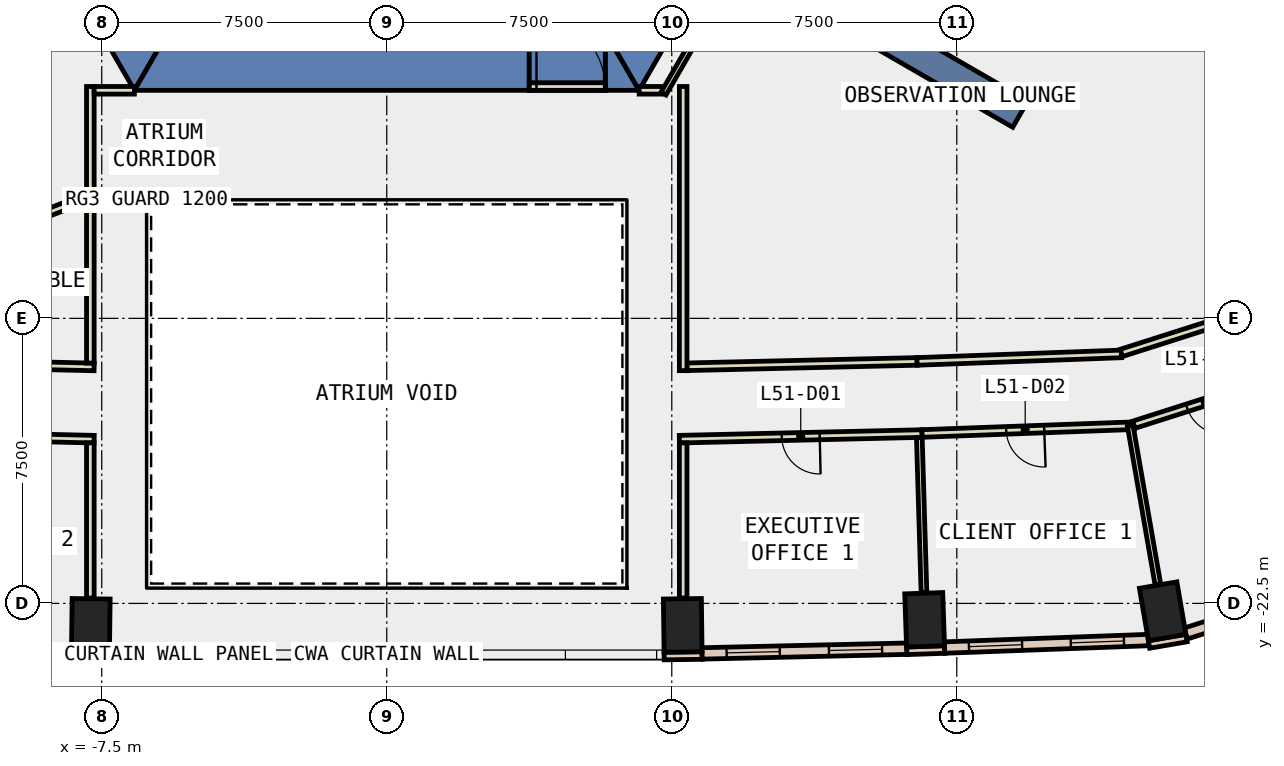
"""IFC4 building model, lengths in metres.
Left out: names, types, materials, properties, quantities, classifications, styles, units other than length and angle.
Written with IfcOpenShell. Run it as: python <this file> out.ifc"""

import sys

from ifc_helpers import new_model, si_unit, direction, frame, frame_2d, origin, origin_2d, place, context, subcontext, project, spatial, polyline, rectangle, outline, extrude, element, fill, save


model = new_model("IFC4")
c1 = context("Model", 3, precision=1e-05, world=origin(), true_north=direction((0.0, 1.0)))
c2 = subcontext(c1, "Body", "Model", "MODEL_VIEW")
j1 = project(units=[si_unit("LENGTHUNIT", "METRE"), si_unit("PLANEANGLEUNIT", "RADIAN")], contexts=[c1])
p1 = place(None, origin())
s1 = spatial("IfcSite", under=j1, at=p1, CompositionType="ELEMENT")
p2 = place(p1, origin())
s2 = spatial("IfcBuilding", under=s1, at=p2, CompositionType="ELEMENT")
p3 = place(p2, frame((0.0, 0.0, 227.6)))
s3 = spatial("IfcBuildingStorey", under=s2, at=p3, CompositionType="ELEMENT", Elevation=227.6)
for number, where, z_axis, x_axis in (
    (1, (-7.788, -23.078, -0.4), (0.0, 0.0, 1.0), (-1.0, 0.013, 0.0)),
    (2, (7.788, -23.078, -0.4), (0.0, 0.0, 1.0), (1.0, 0.013, 0.0)),
    (3, (14.154, -22.931, -0.4), (0.0, 0.0, 1.0), (0.999, 0.034, 0.0)),
    (4, (20.417, -22.708, -0.4), (0.0, 0.0, 1.0), (0.986, 0.169, 0.0)),
):
    element("IfcColumn", number, at=place(p3, frame(where, z_axis=z_axis, x_axis=x_axis)), inside=s3, PredefinedType="COLUMN", context=c2, shape_type="SweptSolid", body=[
        extrude(rectangle(XDim=1.0, YDim=1.4, at=origin_2d()), origin(), (0.0, 0.0, 1.0), 4.2),
    ])
p4 = place(p3, frame((0.0, 0.0, -0.4)))
e5 = element("IfcWall", 5, at=p4, inside=s3, PredefinedType="SHEAR", context=c2, shape_type="SweptSolid", body=[
    extrude(outline(polyline([(-13.279, 2.5), (-6.64, -9.0), (-5.831, -7.6), (-11.662, 2.5), (-13.279, 2.5)])), origin(), (0.0, 0.0, 1.0), 4.2),
])
p5 = place(p3, frame((0.0, 0.0, -0.4)))
e6 = element("IfcWall", 6, at=p5, inside=s3, PredefinedType="SHEAR", context=c2, shape_type="SweptSolid", body=[
    extrude(outline(polyline([(3.75, -9.0), (3.75, -7.6), (-5.831, -7.6), (-6.64, -9.0), (3.75, -9.0)])), origin(), (0.0, 0.0, 1.0), 4.2),
])
p6 = place(p3, frame((0.0, 0.0, -0.4)))
e7 = element("IfcWall", 7, at=p6, inside=s3, PredefinedType="SHEAR", context=c2, shape_type="SweptSolid", body=[
    extrude(outline(polyline([(5.75, -7.6), (5.75, -9.0), (6.64, -9.0), (5.831, -7.6), (5.75, -7.6)])), origin(), (0.0, 0.0, 1.0), 4.2),
])
p7 = place(p3, frame((0.0, 0.0, 3.6)))
e8 = element("IfcWall", 8, at=p7, inside=s3, PredefinedType="SHEAR", context=c2, shape_type="SweptSolid", body=[
    extrude(outline(polyline([(5.75, -9.0), (5.75, -7.6), (3.75, -7.6), (3.75, -9.0), (5.75, -9.0)])), origin(), (0.0, 0.0, 1.0), 0.2),
])
p8 = place(p3, frame((0.0, 0.0, -0.4)))
e9 = element("IfcWall", 9, at=p8, inside=s3, PredefinedType="SHEAR", context=c2, shape_type="SweptSolid", body=[
    extrude(outline(polyline([(6.64, -9.0), (13.279, 2.5), (11.662, 2.5), (5.831, -7.6), (6.64, -9.0)])), origin(), (0.0, 0.0, 1.0), 4.2),
])
for number, where, z_axis, x_axis in (
    (10, (8.877, -5.125, -0.4), (0.0, 0.0, 1.0), (0.866, -0.5, 0.0)),
    (11, (-8.877, -5.125, -0.4), (0.0, 0.0, 1.0), (-0.866, -0.5, 0.0)),
):
    element("IfcWall", number, at=place(p3, frame(where, z_axis=z_axis, x_axis=x_axis)), inside=s3, PredefinedType="SHEAR", context=c2, shape_type="SweptSolid", body=[
        extrude(rectangle(XDim=9.0, YDim=0.8, at=frame_2d((4.5, 0.0))), origin(), (0.0, 0.0, 1.0), 4.2),
    ])
for number, where, z_axis, x_axis in (
    (12, (-8.299, -23.871, 0.0), (0.0, 0.0, 1.0), (1.0, -0.014, 0.0)),
    (13, (7.299, -23.885, 0.0), (0.0, 0.0, 1.0), (1.0, 0.014, 0.0)),
):
    element("IfcWall", number, at=place(p3, frame(where, z_axis=z_axis, x_axis=x_axis)), inside=s3, PredefinedType="STANDARD", context=c2, shape_type="SweptSolid", body=[
        extrude(rectangle(XDim=1.0, YDim=0.2, at=frame_2d((0.5, 0.0))), origin(), (0.0, 0.0, 1.0), 3.8),
    ])
p9 = place(p3, frame((13.682, -23.747, 0.0), z_axis=(0.0, 0.0, 1.0), x_axis=(0.999415245245, 0.034193092457, 0.0)))
e14 = element("IfcWall", 14, at=p9, inside=s3, PredefinedType="STANDARD", context=c2, shape_type="SweptSolid", body=[
    extrude(rectangle(XDim=1.0, YDim=0.2, at=frame_2d((0.5, 0.0))), origin(), (0.0, 0.0, 1.0), 3.8),
])
p10 = place(p3, frame((20.059, -23.581, 0.0), z_axis=(0.0, 0.0, 1.0), x_axis=(0.985631544579, 0.168909615862, 0.0)))
e15 = element("IfcWall", 15, at=p10, inside=s3, PredefinedType="STANDARD", context=c2, shape_type="SweptSolid", body=[
    extrude(rectangle(XDim=1.0, YDim=0.2, at=frame_2d((0.5, 0.0))), origin(), (0.0, 0.0, 1.0), 3.8),
])
p11 = place(p3, frame((-13.681, -23.692, 0.0), z_axis=(0.0, 0.0, 1.0), x_axis=(0.999734766333, -0.023030349233, 0.0)))
e16 = element("IfcWall", 16, at=p11, inside=s3, PredefinedType="STANDARD", context=c2, shape_type="SweptSolid", body=[
    extrude(rectangle(XDim=5.385, YDim=0.3, at=frame_2d((2.693, 0.0))), origin(), (0.0, 0.0, 1.0), 3.8),
])
p12 = place(p11, frame((0.646, 0.0, 0.9)))
e17 = element("IfcOpeningElement", 17, at=p12, cuts=e16, PredefinedType="OPENING", context=c2, shape_type="SweptSolid", body=[
    extrude(rectangle(XDim=1.4, YDim=2.6, at=frame_2d((0.7, 1.3))), frame((0.0, 0.16, 0.0), z_axis=(0.0, -1.0, 0.0), x_axis=(1.0, 0.0, 0.0)), (0.0, 0.0, 1.0), 0.32),
])
p13 = place(p11, frame((3.339, 0.0, 0.9)))
e18 = element("IfcOpeningElement", 18, at=p13, cuts=e16, PredefinedType="OPENING", context=c2, shape_type="SweptSolid", body=[
    extrude(rectangle(XDim=1.4, YDim=2.6, at=frame_2d((0.7, 1.3))), frame((0.0, 0.16, 0.0), z_axis=(0.0, -1.0, 0.0), x_axis=(1.0, 0.0, 0.0)), (0.0, 0.0, 1.0), 0.32),
])
p14 = place(p3, frame((8.297, -23.816, 0.0), z_axis=(0.0, 0.0, 1.0), x_axis=(0.999734766333, 0.023030349233, 0.0)))
e19 = element("IfcWall", 19, at=p14, inside=s3, PredefinedType="STANDARD", context=c2, shape_type="SweptSolid", body=[
    extrude(rectangle(XDim=5.385, YDim=0.3, at=frame_2d((2.693, 0.0))), origin(), (0.0, 0.0, 1.0), 3.8),
])
p15 = place(p14, frame((0.646, 0.0, 0.9)))
e20 = element("IfcOpeningElement", 20, at=p15, cuts=e19, PredefinedType="OPENING", context=c2, shape_type="SweptSolid", body=[
    extrude(rectangle(XDim=1.4, YDim=2.6, at=frame_2d((0.7, 1.3))), frame((0.0, 0.16, 0.0), z_axis=(0.0, -1.0, 0.0), x_axis=(1.0, 0.0, 0.0)), (0.0, 0.0, 1.0), 0.32),
])
p16 = place(p14, frame((3.339, 0.0, 0.9)))
e21 = element("IfcOpeningElement", 21, at=p16, cuts=e19, PredefinedType="OPENING", context=c2, shape_type="SweptSolid", body=[
    extrude(rectangle(XDim=1.4, YDim=2.6, at=frame_2d((0.7, 1.3))), frame((0.0, 0.16, 0.0), z_axis=(0.0, -1.0, 0.0), x_axis=(1.0, 0.0, 0.0)), (0.0, 0.0, 1.0), 0.32),
])
p17 = place(p3, frame((14.679, -23.662, 0.0), z_axis=(0.0, 0.0, 1.0), x_axis=(0.999318693414, 0.036907302717, 0.0)))
e22 = element("IfcWall", 22, at=p17, inside=s3, PredefinedType="STANDARD", context=c2, shape_type="SweptSolid", body=[
    extrude(rectangle(XDim=5.365, YDim=0.3, at=frame_2d((2.682, 0.0))), origin(), (0.0, 0.0, 1.0), 3.8),
])
p18 = place(p17, frame((0.641, 0.0, 0.9)))
e23 = element("IfcOpeningElement", 23, at=p18, cuts=e22, PredefinedType="OPENING", context=c2, shape_type="SweptSolid", body=[
    extrude(rectangle(XDim=1.4, YDim=2.6, at=frame_2d((0.7, 1.3))), frame((0.0, 0.16, 0.0), z_axis=(0.0, -1.0, 0.0), x_axis=(1.0, 0.0, 0.0)), (0.0, 0.0, 1.0), 0.32),
])
p19 = place(p17, frame((3.323, 0.0, 0.9)))
e24 = element("IfcOpeningElement", 24, at=p19, cuts=e22, PredefinedType="OPENING", context=c2, shape_type="SweptSolid", body=[
    extrude(rectangle(XDim=1.4, YDim=2.6, at=frame_2d((0.7, 1.3))), frame((0.0, 0.16, 0.0), z_axis=(0.0, -1.0, 0.0), x_axis=(1.0, 0.0, 0.0)), (0.0, 0.0, 1.0), 0.32),
])
p20 = place(p3, frame((21.023, -23.293, 0.0), z_axis=(0.0, 0.0, 1.0), x_axis=(0.952886818649, 0.30332608006, 0.0)))
e25 = element("IfcWall", 25, at=p20, inside=s3, PredefinedType="STANDARD", context=c2, shape_type="SweptSolid", body=[
    extrude(rectangle(XDim=4.939, YDim=0.3, at=frame_2d((2.469, 0.0))), origin(), (0.0, 0.0, 1.0), 3.8),
])
p21 = place(p20, frame((1.769, 0.0, 0.9)))
e26 = element("IfcOpeningElement", 26, at=p21, cuts=e25, PredefinedType="OPENING", context=c2, shape_type="SweptSolid", body=[
    extrude(rectangle(XDim=1.4, YDim=2.6, at=frame_2d((0.7, 1.3))), frame((0.0, 0.16, 0.0), z_axis=(0.0, -1.0, 0.0), x_axis=(1.0, 0.0, 0.0)), (0.0, 0.0, 1.0), 0.32),
])
p22 = place(p3, frame((7.9, -16.274, 0.0), z_axis=(0.0, 0.0, 1.0), x_axis=(0.999729409829, 0.023261709391, 0.0)))
e27 = element("IfcWall", 27, at=p22, inside=s3, PredefinedType="PARTITIONING", context=c2, shape_type="SweptSolid", body=[
    extrude(rectangle(XDim=6.056, YDim=0.2, at=frame_2d((3.028, 0.0))), origin(), (0.0, 0.0, 1.0), 3.8),
])
p23 = place(p3, frame((13.954, -16.133, 0.0), z_axis=(0.0, 0.0, 1.0), x_axis=(0.999323686931, 0.036771847101, 0.0)))
e28 = element("IfcWall", 28, at=p23, inside=s3, PredefinedType="PARTITIONING", context=c2, shape_type="SweptSolid", body=[
    extrude(rectangle(XDim=5.385, YDim=0.2, at=frame_2d((2.692, 0.0))), origin(), (0.0, 0.0, 1.0), 3.8),
])
p24 = place(p3, frame((19.33, -15.909, 0.0), z_axis=(0.0, 0.0, 1.0), x_axis=(0.952831275662, 0.303500510906, 0.0)))
e29 = element("IfcWall", 29, at=p24, inside=s3, PredefinedType="PARTITIONING", context=c2, shape_type="SweptSolid", body=[
    extrude(rectangle(XDim=3.259, YDim=0.2, at=frame_2d((1.629, 0.0))), origin(), (0.0, 0.0, 1.0), 3.8),
])
p25 = place(p3, frame((23.121, -9.819, 0.0), z_axis=(0.0, 0.0, 1.0), x_axis=(-0.469450210487, 0.882958945746, 0.0)))
e30 = element("IfcWall", 30, at=p25, inside=s3, PredefinedType="PARTITIONING", context=c2, shape_type="SweptSolid", body=[
    extrude(rectangle(XDim=7.886, YDim=0.2, at=frame_2d((3.943, 0.0))), origin(), (0.0, 0.0, 1.0), 3.8),
])
p26 = place(p3, frame((-13.954, -16.133, 0.0), z_axis=(0.0, 0.0, 1.0), x_axis=(0.999731273021, -0.023181495732, 0.0)))
e31 = element("IfcWall", 31, at=p26, inside=s3, PredefinedType="PARTITIONING", context=c2, shape_type="SweptSolid", body=[
    extrude(rectangle(XDim=6.256, YDim=0.2, at=frame_2d((3.128, 0.0))), origin(), (0.0, 0.0, 1.0), 3.8),
])
p27 = place(p26, frame((2.628, 0.0, 0.0)))
e32 = element("IfcOpeningElement", 32, at=p27, cuts=e31, PredefinedType="OPENING", context=c2, shape_type="SweptSolid", body=[
    extrude(rectangle(XDim=1.0, YDim=2.1, at=frame_2d((0.5, 1.05))), frame((0.0, 0.11, 0.0), z_axis=(0.0, -1.0, 0.0), x_axis=(1.0, 0.0, 0.0)), (0.0, 0.0, 1.0), 0.22),
])
p28 = place(p3, frame((14.086, -18.031, 0.0), z_axis=(0.0, 0.0, 1.0), x_axis=(-0.999731734638, -0.023161579355, 0.0)))
e33 = element("IfcWall", 33, at=p28, inside=s3, PredefinedType="PARTITIONING", context=c2, shape_type="SweptSolid", body=[
    extrude(rectangle(XDim=6.388, YDim=0.2, at=frame_2d((3.194, 0.0))), origin(), (0.0, 0.0, 1.0), 3.8),
])
p29 = place(p28, frame((2.694, 0.0, 0.0)))
e34 = element("IfcOpeningElement", 34, at=p29, cuts=e33, PredefinedType="OPENING", context=c2, shape_type="SweptSolid", body=[
    extrude(rectangle(XDim=1.0, YDim=2.1, at=frame_2d((0.5, 1.05))), frame((0.0, 0.11, 0.0), z_axis=(0.0, -1.0, 0.0), x_axis=(1.0, 0.0, 0.0)), (0.0, 0.0, 1.0), 0.22),
])
p30 = place(p3, frame((19.664, -17.824, 0.0), z_axis=(0.0, 0.0, 1.0), x_axis=(-0.999324862533, -0.036739884652, 0.0)))
e35 = element("IfcWall", 35, at=p30, inside=s3, PredefinedType="PARTITIONING", context=c2, shape_type="SweptSolid", body=[
    extrude(rectangle(XDim=5.582, YDim=0.2, at=frame_2d((2.791, 0.0))), origin(), (0.0, 0.0, 1.0), 3.8),
])
p31 = place(p30, frame((2.366, 0.0, 0.0)))
e36 = element("IfcOpeningElement", 36, at=p31, cuts=e35, PredefinedType="OPENING", context=c2, shape_type="SweptSolid", body=[
    extrude(rectangle(XDim=1.0, YDim=2.1, at=frame_2d((0.5, 1.05))), frame((0.0, 0.11, 0.0), z_axis=(0.0, -1.0, 0.0), x_axis=(1.0, 0.0, 0.0)), (0.0, 0.0, 1.0), 0.22),
])
p32 = place(p3, frame((23.412, -16.603, 0.0), z_axis=(0.0, 0.0, 1.0), x_axis=(-0.952838618572, -0.303477457083, 0.0)))
e37 = element("IfcWall", 37, at=p32, inside=s3, PredefinedType="PARTITIONING", context=c2, shape_type="SweptSolid", body=[
    extrude(rectangle(XDim=3.938, YDim=0.2, at=frame_2d((1.969, 0.0))), origin(), (0.0, 0.0, 1.0), 3.8),
])
p33 = place(p32, frame((1.469, 0.0, 0.0)))
e38 = element("IfcOpeningElement", 38, at=p33, cuts=e37, PredefinedType="OPENING", context=c2, shape_type="SweptSolid", body=[
    extrude(rectangle(XDim=1.0, YDim=2.1, at=frame_2d((0.5, 1.05))), frame((0.0, 0.11, 0.0), z_axis=(0.0, -1.0, 0.0), x_axis=(1.0, 0.0, 0.0)), (0.0, 0.0, 1.0), 0.22),
])
p34 = place(p3, frame((21.089, -1.949, 0.0), z_axis=(0.0, 0.0, 1.0), x_axis=(0.469431794586, -0.882968736837, 0.0)))
e39 = element("IfcWall", 39, at=p34, inside=s3, PredefinedType="PARTITIONING", context=c2, shape_type="SweptSolid", body=[
    extrude(rectangle(XDim=8.046, YDim=0.2, at=frame_2d((4.023, 0.0))), origin(), (0.0, 0.0, 1.0), 3.8),
])
p35 = place(p34, frame((3.522, 0.0, 0.0)))
e40 = element("IfcOpeningElement", 40, at=p35, cuts=e39, PredefinedType="OPENING", context=c2, shape_type="SweptSolid", body=[
    extrude(rectangle(XDim=1.0, YDim=2.1, at=frame_2d((0.5, 1.05))), frame((0.0, 0.11, 0.0), z_axis=(0.0, -1.0, 0.0), x_axis=(1.0, 0.0, 0.0)), (0.0, 0.0, 1.0), 0.22),
])
p36 = place(p3, frame((-7.7, -18.179, 0.0), z_axis=(0.0, 0.0, 1.0), x_axis=(-0.999729714353, 0.023248618029, 0.0)))
e41 = element("IfcWall", 41, at=p36, inside=s3, PredefinedType="PARTITIONING", context=c2, shape_type="SweptSolid", body=[
    extrude(rectangle(XDim=6.238, YDim=0.2, at=frame_2d((3.119, 0.0))), origin(), (0.0, 0.0, 1.0), 3.8),
])
p37 = place(p36, frame((2.694, 0.0, 0.0)))
e42 = element("IfcOpeningElement", 42, at=p37, cuts=e41, PredefinedType="OPENING", context=c2, shape_type="SweptSolid", body=[
    extrude(rectangle(XDim=1.0, YDim=2.1, at=frame_2d((0.5, 1.05))), frame((0.0, 0.11, 0.0), z_axis=(0.0, -1.0, 0.0), x_axis=(1.0, 0.0, 0.0)), (0.0, 0.0, 1.0), 0.22),
])
p38 = place(p3, frame((6.641, -8.999, 0.0), z_axis=(0.0, 0.0, 1.0), x_axis=(1.0, 0.0, 0.0)))
e43 = element("IfcWall", 43, at=p38, inside=s3, PredefinedType="PARTITIONING", context=c2, shape_type="SweptSolid", body=[
    extrude(rectangle(XDim=0.617, YDim=0.2, at=frame_2d((0.309, 0.0))), origin(), (0.0, 0.0, 1.0), 3.8),
])
p39 = place(p3, frame((7.283, -9.086, 0.0), z_axis=(0.0, 0.0, 1.0), x_axis=(0.500035303972, 0.866005020067, 0.0)))
e44 = element("IfcWall", 44, at=p39, inside=s3, PredefinedType="PARTITIONING", context=c2, shape_type="SweptSolid", body=[
    extrude(rectangle(XDim=3.828, YDim=0.15, at=frame_2d((1.914, 0.0))), origin(), (0.0, 0.0, 1.0), 3.8),
])
p40 = place(p3, frame((7.8, -8.899, 0.0), z_axis=(0.0, 0.0, 1.0), x_axis=(0.0, -1.0, 0.0)))
e45 = element("IfcWall", 45, at=p40, inside=s3, PredefinedType="PARTITIONING", context=c2, shape_type="SweptSolid", body=[
    extrude(rectangle(XDim=7.477, YDim=0.2, at=frame_2d((3.739, 0.0))), origin(), (0.0, 0.0, 1.0), 3.8),
])
p41 = place(p3, frame((-7.8, -11.69, 0.0), z_axis=(0.0, 0.0, 1.0), x_axis=(0.0, 1.0, 0.0)))
e46 = element("IfcWall", 46, at=p41, inside=s3, PredefinedType="PARTITIONING", context=c2, shape_type="SweptSolid", body=[
    extrude(rectangle(XDim=2.791, YDim=0.2, at=frame_2d((1.396, 0.0))), origin(), (0.0, 0.0, 1.0), 3.8),
])
p42 = place(p3, frame((-7.7, -8.999, 0.0), z_axis=(0.0, 0.0, 1.0), x_axis=(1.0, 0.0, 0.0)))
e47 = element("IfcWall", 47, at=p42, inside=s3, PredefinedType="PARTITIONING", context=c2, shape_type="SweptSolid", body=[
    extrude(rectangle(XDim=1.059, YDim=0.2, at=frame_2d((0.529, 0.0))), origin(), (0.0, 0.0, 1.0), 3.8),
])
p43 = place(p3, frame((-7.8, -16.176, 0.0), z_axis=(0.0, 0.0, 1.0), x_axis=(0.0, 1.0, 0.0)))
e48 = element("IfcWall", 48, at=p43, inside=s3, PredefinedType="PARTITIONING", context=c2, shape_type="SweptSolid", body=[
    extrude(rectangle(XDim=4.286, YDim=0.2, at=frame_2d((2.143, 0.0))), origin(), (0.0, 0.0, 1.0), 3.8),
])
for number, where, z_axis, x_axis in (
    (49, (7.8, -18.276, 0.0), (0.0, 0.0, 1.0), (0.0, -1.0, 0.0)),
    (50, (-7.8, -22.358, 0.0), (0.0, 0.0, 1.0), (0.0, 1.0, 0.0)),
):
    element("IfcWall", number, at=place(p3, frame(where, z_axis=z_axis, x_axis=x_axis)), inside=s3, PredefinedType="PARTITIONING", context=c2, shape_type="SweptSolid", body=[
        extrude(rectangle(XDim=4.082, YDim=0.2, at=frame_2d((2.041, 0.0))), origin(), (0.0, 0.0, 1.0), 3.8),
    ])
p44 = place(p3, frame((-7.707, -11.755, 0.0), z_axis=(0.0, 0.0, 1.0), x_axis=(-0.933420343818, -0.358784701105, 0.0)))
e51 = element("IfcWall", 51, at=p44, inside=s3, PredefinedType="PARTITIONING", context=c2, shape_type="SweptSolid", body=[
    extrude(rectangle(XDim=8.501, YDim=0.2, at=frame_2d((4.25, 0.0))), origin(), (0.0, 0.0, 1.0), 3.8),
])
p45 = place(p3, frame((14.014, -18.132, 0.0), z_axis=(0.0, 0.0, 1.0), x_axis=(0.029914181802, -0.999552470722, 0.0)))
e52 = element("IfcWall", 52, at=p45, inside=s3, PredefinedType="PARTITIONING", context=c2, shape_type="SweptSolid", body=[
    extrude(rectangle(XDim=4.081, YDim=0.15, at=frame_2d((2.04, 0.0))), origin(), (0.0, 0.0, 1.0), 3.8),
])
p46 = place(p3, frame((19.564, -17.828, 0.0), z_axis=(0.0, 0.0, 1.0), x_axis=(0.171715909123, -0.985146510197, 0.0)))
e53 = element("IfcWall", 53, at=p46, inside=s3, PredefinedType="PARTITIONING", context=c2, shape_type="SweptSolid", body=[
    extrude(rectangle(XDim=4.234, YDim=0.15, at=frame_2d((2.117, 0.0))), origin(), (0.0, 0.0, 1.0), 3.8),
])
p47 = place(p3, frame((3.75, -8.9, 0.0), z_axis=(0.0, 0.0, 1.0), x_axis=(1.0, 0.0, 0.0)))
e54 = element("IfcWall", 54, at=p47, inside=s3, PredefinedType="PARTITIONING", context=c2, shape_type="SweptSolid", body=[
    extrude(rectangle(XDim=2.0, YDim=0.2, at=frame_2d((1.0, 0.0))), origin(), (0.0, 0.0, 1.0), 2.4),
])
p48 = place(p47, frame((0.19, 0.0, 0.0)))
e55 = element("IfcOpeningElement", 55, at=p48, cuts=e54, PredefinedType="OPENING", context=c2, shape_type="SweptSolid", body=[
    extrude(rectangle(XDim=1.8, YDim=2.1, at=frame_2d((0.9, 1.05))), frame((0.0, 0.11, 0.0), z_axis=(0.0, -1.0, 0.0), x_axis=(1.0, 0.0, 0.0)), (0.0, 0.0, 1.0), 0.22),
])
p49 = place(p15, origin())
e56 = element("IfcWindow", 56, at=p49, inside=s3, PartitioningType="SINGLE_PANEL", PredefinedType="WINDOW", context=c2, shape_type="SweptSolid", body=[
    extrude(rectangle(XDim=1.4, YDim=2.6, at=frame_2d((0.7, 1.3))), frame((0.0, 0.03, 0.0), z_axis=(0.0, -1.0, 0.0), x_axis=(1.0, 0.0, 0.0)), (0.0, 0.0, 1.0), 0.06),
])
fill(e20, e56)
p50 = place(p16, origin())
e57 = element("IfcWindow", 57, at=p50, inside=s3, PartitioningType="SINGLE_PANEL", PredefinedType="WINDOW", context=c2, shape_type="SweptSolid", body=[
    extrude(rectangle(XDim=1.4, YDim=2.6, at=frame_2d((0.7, 1.3))), frame((0.0, 0.03, 0.0), z_axis=(0.0, -1.0, 0.0), x_axis=(1.0, 0.0, 0.0)), (0.0, 0.0, 1.0), 0.06),
])
fill(e21, e57)
p51 = place(p18, origin())
e58 = element("IfcWindow", 58, at=p51, inside=s3, PartitioningType="SINGLE_PANEL", PredefinedType="WINDOW", context=c2, shape_type="SweptSolid", body=[
    extrude(rectangle(XDim=1.4, YDim=2.6, at=frame_2d((0.7, 1.3))), frame((0.0, 0.03, 0.0), z_axis=(0.0, -1.0, 0.0), x_axis=(1.0, 0.0, 0.0)), (0.0, 0.0, 1.0), 0.06),
])
fill(e23, e58)
p52 = place(p19, origin())
e59 = element("IfcWindow", 59, at=p52, inside=s3, PartitioningType="SINGLE_PANEL", PredefinedType="WINDOW", context=c2, shape_type="SweptSolid", body=[
    extrude(rectangle(XDim=1.4, YDim=2.6, at=frame_2d((0.7, 1.3))), frame((0.0, 0.03, 0.0), z_axis=(0.0, -1.0, 0.0), x_axis=(1.0, 0.0, 0.0)), (0.0, 0.0, 1.0), 0.06),
])
fill(e24, e59)
p53 = place(p29, origin())
e60 = element("IfcDoor", 60, at=p53, inside=s3, OperationType="SINGLE_SWING_LEFT", PredefinedType="DOOR", context=c2, shape_type="SweptSolid", body=[
    extrude(rectangle(XDim=1.0, YDim=2.1, at=frame_2d((0.5, 1.05))), frame((0.0, 0.025, 0.0), z_axis=(0.0, -1.0, 0.0), x_axis=(1.0, 0.0, 0.0)), (0.0, 0.0, 1.0), 0.05),
])
fill(e34, e60)
p54 = place(p31, origin())
e61 = element("IfcDoor", 61, at=p54, inside=s3, OperationType="SINGLE_SWING_LEFT", PredefinedType="DOOR", context=c2, shape_type="SweptSolid", body=[
    extrude(rectangle(XDim=1.0, YDim=2.1, at=frame_2d((0.5, 1.05))), frame((0.0, 0.025, 0.0), z_axis=(0.0, -1.0, 0.0), x_axis=(1.0, 0.0, 0.0)), (0.0, 0.0, 1.0), 0.05),
])
fill(e36, e61)
p55 = place(p33, origin())
e62 = element("IfcDoor", 62, at=p55, inside=s3, OperationType="SINGLE_SWING_LEFT", PredefinedType="DOOR", context=c2, shape_type="SweptSolid", body=[
    extrude(rectangle(XDim=1.0, YDim=2.1, at=frame_2d((0.5, 1.05))), frame((0.0, 0.025, 0.0), z_axis=(0.0, -1.0, 0.0), x_axis=(1.0, 0.0, 0.0)), (0.0, 0.0, 1.0), 0.05),
])
fill(e38, e62)
p56 = place(p48, origin())
e63 = element("IfcDoor", 63, at=p56, inside=s3, OperationType="DOUBLE_DOOR_SINGLE_SWING", PredefinedType="DOOR", context=c2, shape_type="SweptSolid", body=[
    extrude(rectangle(XDim=1.8, YDim=2.1, at=frame_2d((0.9, 1.05))), frame((0.0, 0.025, 0.0), z_axis=(0.0, -1.0, 0.0), x_axis=(1.0, 0.0, 0.0)), (0.0, 0.0, 1.0), 0.05),
])
fill(e55, e63)
save(model, sys.argv[1])
